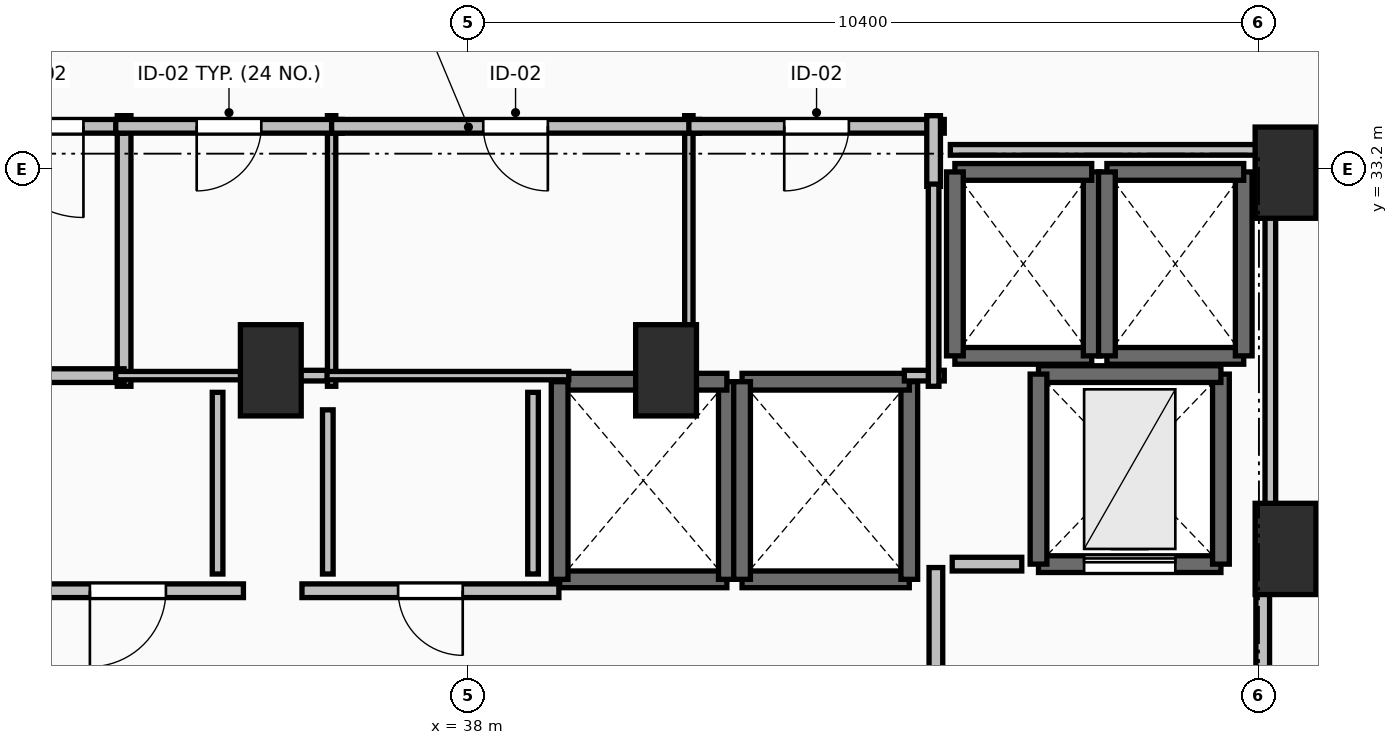
"""IFC4 building model, lengths in metres.
Left out: names, types, materials, properties, quantities, classifications, styles, units other than length and angle.
Written with IfcOpenShell. Run it as: python <this file> out.ifc"""

import sys

from ifc_helpers import new_model, si_unit, direction, frame, frame_2d, origin, origin_2d, place, context, subcontext, project, spatial, rectangle, extrude, element, fill, save


model = new_model("IFC4")
c1 = context("Model", 3, precision=1e-05, world=origin(), true_north=direction((0.0, 1.0)))
c2 = subcontext(c1, "Body", "Model", "MODEL_VIEW")
j1 = project(units=[si_unit("LENGTHUNIT", "METRE"), si_unit("PLANEANGLEUNIT", "RADIAN")], contexts=[c1])
p1 = place(None, origin())
s1 = spatial("IfcSite", under=j1, at=p1, CompositionType="ELEMENT")
p2 = place(p1, origin())
s2 = spatial("IfcBuilding", under=s1, at=p2, CompositionType="ELEMENT")
p3 = place(p2, frame((0.0, 0.0, 146.6)))
s3 = spatial("IfcBuildingStorey", under=s2, at=p3, CompositionType="ELEMENT", Elevation=146.6)
for number, where, z_axis, x_axis in (
    (1, (48.75, 33.15, 0.0), (0.0, 0.0, 1.0), (1.0, 0.0, 0.0)),
    (2, (48.75, 28.2, 0.0), (0.0, 0.0, 1.0), (1.0, 0.0, 0.0)),
    (3, (35.4, 30.55, 0.0), (0.0, 0.0, 1.0), (1.0, 0.0, 0.0)),
    (4, (40.6, 30.55, 0.0), (0.0, 0.0, 1.0), (1.0, 0.0, 0.0)),
):
    element("IfcColumn", number, at=place(p3, frame(where, z_axis=z_axis, x_axis=x_axis)), inside=s3, PredefinedType="PILASTER", context=c2, shape_type="SweptSolid", body=[
        extrude(rectangle(XDim=0.8, YDim=1.2, at=origin_2d()), origin(), (0.0, 0.0, 1.0), 3.5),
    ])
p4 = place(p3, frame((39.2, 27.8, 0.0), z_axis=(0.0, 0.0, 1.0), x_axis=(1.0, 0.0, 0.0)))
e5 = element("IfcWall", 5, at=p4, inside=s3, PredefinedType="SOLIDWALL", context=c2, shape_type="SweptSolid", body=[
    extrude(rectangle(XDim=2.2, YDim=0.22, at=frame_2d((1.1, 0.0))), origin(), (0.0, 0.0, 1.0), 3.24),
])
p5 = place(p3, frame((41.4, 27.8, 0.0), z_axis=(0.0, 0.0, 1.0), x_axis=(0.0, 1.0, 0.0)))
e6 = element("IfcWall", 6, at=p5, inside=s3, PredefinedType="SOLIDWALL", context=c2, shape_type="SweptSolid", body=[
    extrude(rectangle(XDim=2.6, YDim=0.22, at=frame_2d((1.3, 0.0))), origin(), (0.0, 0.0, 1.0), 3.24),
])
p6 = place(p3, frame((41.4, 30.4, 0.0), z_axis=(0.0, 0.0, 1.0), x_axis=(-1.0, 0.0, 0.0)))
e7 = element("IfcWall", 7, at=p6, inside=s3, PredefinedType="SOLIDWALL", context=c2, shape_type="SweptSolid", body=[
    extrude(rectangle(XDim=2.2, YDim=0.22, at=frame_2d((1.1, 0.0))), origin(), (0.0, 0.0, 1.0), 3.24),
])
p7 = place(p3, frame((39.2, 30.4, 0.0), z_axis=(0.0, 0.0, 1.0), x_axis=(0.0, -1.0, 0.0)))
e8 = element("IfcWall", 8, at=p7, inside=s3, PredefinedType="SOLIDWALL", context=c2, shape_type="SweptSolid", body=[
    extrude(rectangle(XDim=2.6, YDim=0.22, at=frame_2d((1.3, 0.0))), origin(), (0.0, 0.0, 1.0), 3.24),
])
p8 = place(p3, frame((41.6, 27.8, 0.0), z_axis=(0.0, 0.0, 1.0), x_axis=(1.0, 0.0, 0.0)))
e9 = element("IfcWall", 9, at=p8, inside=s3, PredefinedType="SOLIDWALL", context=c2, shape_type="SweptSolid", body=[
    extrude(rectangle(XDim=2.2, YDim=0.22, at=frame_2d((1.1, 0.0))), origin(), (0.0, 0.0, 1.0), 3.24),
])
p9 = place(p3, frame((43.8, 27.8, 0.0), z_axis=(0.0, 0.0, 1.0), x_axis=(0.0, 1.0, 0.0)))
e10 = element("IfcWall", 10, at=p9, inside=s3, PredefinedType="SOLIDWALL", context=c2, shape_type="SweptSolid", body=[
    extrude(rectangle(XDim=2.6, YDim=0.22, at=frame_2d((1.3, 0.0))), origin(), (0.0, 0.0, 1.0), 3.24),
])
p10 = place(p3, frame((43.8, 30.4, 0.0), z_axis=(0.0, 0.0, 1.0), x_axis=(-1.0, 0.0, 0.0)))
e11 = element("IfcWall", 11, at=p10, inside=s3, PredefinedType="SOLIDWALL", context=c2, shape_type="SweptSolid", body=[
    extrude(rectangle(XDim=2.2, YDim=0.22, at=frame_2d((1.1, 0.0))), origin(), (0.0, 0.0, 1.0), 3.24),
])
p11 = place(p3, frame((41.6, 30.4, 0.0), z_axis=(0.0, 0.0, 1.0), x_axis=(0.0, -1.0, 0.0)))
e12 = element("IfcWall", 12, at=p11, inside=s3, PredefinedType="SOLIDWALL", context=c2, shape_type="SweptSolid", body=[
    extrude(rectangle(XDim=2.6, YDim=0.22, at=frame_2d((1.3, 0.0))), origin(), (0.0, 0.0, 1.0), 3.24),
])
p12 = place(p3, frame((44.4, 30.74, 0.0), z_axis=(0.0, 0.0, 1.0), x_axis=(1.0, 0.0, 0.0)))
e13 = element("IfcWall", 13, at=p12, inside=s3, PredefinedType="SOLIDWALL", context=c2, shape_type="SweptSolid", body=[
    extrude(rectangle(XDim=1.8, YDim=0.22, at=frame_2d((0.9, 0.0))), origin(), (0.0, 0.0, 1.0), 3.24),
])
p13 = place(p3, frame((46.2, 30.74, 0.0), z_axis=(0.0, 0.0, 1.0), x_axis=(0.0, 1.0, 0.0)))
e14 = element("IfcWall", 14, at=p13, inside=s3, PredefinedType="SOLIDWALL", context=c2, shape_type="SweptSolid", body=[
    extrude(rectangle(XDim=2.42, YDim=0.22, at=frame_2d((1.21, 0.0))), origin(), (0.0, 0.0, 1.0), 3.24),
])
p14 = place(p3, frame((46.2, 33.16, 0.0), z_axis=(0.0, 0.0, 1.0), x_axis=(-1.0, 0.0, 0.0)))
e15 = element("IfcWall", 15, at=p14, inside=s3, PredefinedType="SOLIDWALL", context=c2, shape_type="SweptSolid", body=[
    extrude(rectangle(XDim=1.8, YDim=0.22, at=frame_2d((0.9, 0.0))), origin(), (0.0, 0.0, 1.0), 3.24),
])
p15 = place(p3, frame((44.4, 33.16, 0.0), z_axis=(0.0, 0.0, 1.0), x_axis=(0.0, -1.0, 0.0)))
e16 = element("IfcWall", 16, at=p15, inside=s3, PredefinedType="SOLIDWALL", context=c2, shape_type="SweptSolid", body=[
    extrude(rectangle(XDim=2.42, YDim=0.22, at=frame_2d((1.21, 0.0))), origin(), (0.0, 0.0, 1.0), 3.24),
])
p16 = place(p3, frame((46.4, 30.74, 0.0), z_axis=(0.0, 0.0, 1.0), x_axis=(1.0, 0.0, 0.0)))
e17 = element("IfcWall", 17, at=p16, inside=s3, PredefinedType="SOLIDWALL", context=c2, shape_type="SweptSolid", body=[
    extrude(rectangle(XDim=1.8, YDim=0.22, at=frame_2d((0.9, 0.0))), origin(), (0.0, 0.0, 1.0), 3.24),
])
p17 = place(p3, frame((48.2, 30.74, 0.0), z_axis=(0.0, 0.0, 1.0), x_axis=(0.0, 1.0, 0.0)))
e18 = element("IfcWall", 18, at=p17, inside=s3, PredefinedType="SOLIDWALL", context=c2, shape_type="SweptSolid", body=[
    extrude(rectangle(XDim=2.42, YDim=0.22, at=frame_2d((1.21, 0.0))), origin(), (0.0, 0.0, 1.0), 3.24),
])
p18 = place(p3, frame((48.2, 33.16, 0.0), z_axis=(0.0, 0.0, 1.0), x_axis=(-1.0, 0.0, 0.0)))
e19 = element("IfcWall", 19, at=p18, inside=s3, PredefinedType="SOLIDWALL", context=c2, shape_type="SweptSolid", body=[
    extrude(rectangle(XDim=1.8, YDim=0.22, at=frame_2d((0.9, 0.0))), origin(), (0.0, 0.0, 1.0), 3.24),
])
p19 = place(p3, frame((46.4, 33.16, 0.0), z_axis=(0.0, 0.0, 1.0), x_axis=(0.0, -1.0, 0.0)))
e20 = element("IfcWall", 20, at=p19, inside=s3, PredefinedType="SOLIDWALL", context=c2, shape_type="SweptSolid", body=[
    extrude(rectangle(XDim=2.42, YDim=0.22, at=frame_2d((1.21, 0.0))), origin(), (0.0, 0.0, 1.0), 3.24),
])
p20 = place(p3, frame((45.5, 28.0, 0.0), z_axis=(0.0, 0.0, 1.0), x_axis=(1.0, 0.0, 0.0)))
e21 = element("IfcWall", 21, at=p20, inside=s3, PredefinedType="SHEAR", context=c2, shape_type="SweptSolid", body=[
    extrude(rectangle(XDim=2.4, YDim=0.22, at=frame_2d((1.2, 0.0))), origin(), (0.0, 0.0, 1.0), 3.24),
])
p21 = place(p20, frame((0.6, 0.0, 0.0)))
e22 = element("IfcOpeningElement", 22, at=p21, cuts=e21, PredefinedType="OPENING", context=c2, shape_type="SweptSolid", body=[
    extrude(rectangle(XDim=1.2, YDim=2.2, at=frame_2d((0.6, 1.1))), frame((0.0, 0.125, 0.0), z_axis=(0.0, -1.0, 0.0), x_axis=(1.0, 0.0, 0.0)), (0.0, 0.0, 1.0), 0.25),
])
p22 = place(p3, frame((47.9, 28.0, 0.0), z_axis=(0.0, 0.0, 1.0), x_axis=(0.0, 1.0, 0.0)))
e23 = element("IfcWall", 23, at=p22, inside=s3, PredefinedType="SHEAR", context=c2, shape_type="SweptSolid", body=[
    extrude(rectangle(XDim=2.5, YDim=0.22, at=frame_2d((1.25, 0.0))), origin(), (0.0, 0.0, 1.0), 3.24),
])
p23 = place(p3, frame((47.9, 30.5, 0.0), z_axis=(0.0, 0.0, 1.0), x_axis=(-1.0, 0.0, 0.0)))
e24 = element("IfcWall", 24, at=p23, inside=s3, PredefinedType="SHEAR", context=c2, shape_type="SweptSolid", body=[
    extrude(rectangle(XDim=2.4, YDim=0.22, at=frame_2d((1.2, 0.0))), origin(), (0.0, 0.0, 1.0), 3.24),
])
p24 = place(p3, frame((45.5, 30.5, 0.0), z_axis=(0.0, 0.0, 1.0), x_axis=(0.0, -1.0, 0.0)))
e25 = element("IfcWall", 25, at=p24, inside=s3, PredefinedType="SHEAR", context=c2, shape_type="SweptSolid", body=[
    extrude(rectangle(XDim=2.5, YDim=0.22, at=frame_2d((1.25, 0.0))), origin(), (0.0, 0.0, 1.0), 3.24),
])
p25 = place(p3, frame((44.15, 27.955, 0.0), z_axis=(0.0, 0.0, 1.0), x_axis=(0.0, -1.0, 0.0)))
e26 = element("IfcWall", 26, at=p25, inside=s3, PredefinedType="PARTITIONING", context=c2, shape_type="SweptSolid", body=[
    extrude(rectangle(XDim=3.91, YDim=0.18, at=frame_2d((1.955, 0.0))), origin(), (0.0, 0.0, 1.0), 3.24),
])
p26 = place(p25, frame((1.355, 0.0, 0.0)))
e27 = element("IfcOpeningElement", 27, at=p26, cuts=e26, PredefinedType="OPENING", context=c2, shape_type="SweptSolid", body=[
    extrude(rectangle(XDim=1.2, YDim=2.15, at=frame_2d((0.6, 1.075))), frame((0.0, 0.105, 0.0), z_axis=(0.0, -1.0, 0.0), x_axis=(1.0, 0.0, 0.0)), (0.0, 0.0, 1.0), 0.21),
])
p27 = place(p3, frame((48.45, 23.95, 0.0), z_axis=(0.0, 0.0, 1.0), x_axis=(0.0, 1.0, 0.0)))
e28 = element("IfcWall", 28, at=p27, inside=s3, PredefinedType="PARTITIONING", context=c2, shape_type="SweptSolid", body=[
    extrude(rectangle(XDim=4.05, YDim=0.18, at=frame_2d((2.025, 0.0))), origin(), (0.0, 0.0, 1.0), 3.24),
])
p28 = place(p27, frame((1.425, 0.0, 0.0)))
e29 = element("IfcOpeningElement", 29, at=p28, cuts=e28, PredefinedType="OPENING", context=c2, shape_type="SweptSolid", body=[
    extrude(rectangle(XDim=1.2, YDim=2.15, at=frame_2d((0.6, 1.075))), frame((0.0, 0.105, 0.0), z_axis=(0.0, -1.0, 0.0), x_axis=(1.0, 0.0, 0.0)), (0.0, 0.0, 1.0), 0.21),
])
p29 = place(p3, frame((33.47, 30.34, 0.0), z_axis=(0.0, 0.0, 1.0), x_axis=(0.0, 1.0, 0.0)))
e30 = element("IfcWall", 30, at=p29, inside=s3, PredefinedType="PARTITIONING", context=c2, shape_type="SweptSolid", body=[
    extrude(rectangle(XDim=3.56, YDim=0.18, at=frame_2d((1.78, 0.0))), origin(), (0.0, 0.0, 1.0), 3.24),
])
p30 = place(p3, frame((31.87, 30.48, 0.0), z_axis=(0.0, 0.0, 1.0), x_axis=(1.0, 0.0, 0.0)))
e31 = element("IfcWall", 31, at=p30, inside=s3, PredefinedType="PARTITIONING", context=c2, shape_type="SweptSolid", body=[
    extrude(rectangle(XDim=1.6, YDim=0.18, at=frame_2d((0.8, 0.0))), origin(), (0.0, 0.0, 1.0), 3.24),
])
p31 = place(p3, frame((33.47, 33.76, 0.0), z_axis=(0.0, 0.0, 1.0), x_axis=(-1.0, 0.0, 0.0)))
e32 = element("IfcWall", 32, at=p31, inside=s3, PredefinedType="PARTITIONING", context=c2, shape_type="SweptSolid", body=[
    extrude(rectangle(XDim=2.27, YDim=0.18, at=frame_2d((1.135, 0.0))), origin(), (0.0, 0.0, 1.0), 3.24),
])
p32 = place(p31, frame((0.535, 0.0, 0.0)))
e33 = element("IfcOpeningElement", 33, at=p32, cuts=e32, PredefinedType="OPENING", context=c2, shape_type="SweptSolid", body=[
    extrude(rectangle(XDim=1.2, YDim=2.15, at=frame_2d((0.6, 1.075))), frame((0.0, 0.105, 0.0), z_axis=(0.0, -1.0, 0.0), x_axis=(1.0, 0.0, 0.0)), (0.0, 0.0, 1.0), 0.21),
])
p33 = place(p3, frame((35.04, 27.65, 0.0), z_axis=(0.0, 0.0, 1.0), x_axis=(-1.0, 0.0, 0.0)))
e34 = element("IfcWall", 34, at=p33, inside=s3, PredefinedType="PARTITIONING", context=c2, shape_type="SweptSolid", body=[
    extrude(rectangle(XDim=3.04, YDim=0.18, at=frame_2d((1.52, 0.0))), origin(), (0.0, 0.0, 1.0), 3.24),
])
p34 = place(p33, frame((1.02, 0.0, 0.0)))
e35 = element("IfcOpeningElement", 35, at=p34, cuts=e34, PredefinedType="OPENING", context=c2, shape_type="SweptSolid", body=[
    extrude(rectangle(XDim=1.0, YDim=2.15, at=frame_2d((0.5, 1.075))), frame((0.0, 0.105, 0.0), z_axis=(0.0, -1.0, 0.0), x_axis=(1.0, 0.0, 0.0)), (0.0, 0.0, 1.0), 0.21),
])
p35 = place(p3, frame((39.19, 27.65, 0.0), z_axis=(0.0, 0.0, 1.0), x_axis=(-1.0, 0.0, 0.0)))
e36 = element("IfcWall", 36, at=p35, inside=s3, PredefinedType="PARTITIONING", context=c2, shape_type="SweptSolid", body=[
    extrude(rectangle(XDim=3.38, YDim=0.18, at=frame_2d((1.69, 0.0))), origin(), (0.0, 0.0, 1.0), 3.24),
])
p36 = place(p35, frame((1.265, 0.0, 0.0)))
e37 = element("IfcOpeningElement", 37, at=p36, cuts=e36, PredefinedType="OPENING", context=c2, shape_type="SweptSolid", body=[
    extrude(rectangle(XDim=0.85, YDim=2.1, at=frame_2d((0.425, 1.05))), frame((0.0, 0.105, 0.0), z_axis=(0.0, -1.0, 0.0), x_axis=(1.0, 0.0, 0.0)), (0.0, 0.0, 1.0), 0.21),
])
p37 = place(p3, frame((36.2, 30.34, 0.0), z_axis=(0.0, 0.0, 1.0), x_axis=(0.0, 1.0, 0.0)))
e38 = element("IfcWall", 38, at=p37, inside=s3, PredefinedType="PARTITIONING", context=c2, shape_type="SweptSolid", body=[
    extrude(rectangle(XDim=3.56, YDim=0.11, at=frame_2d((1.78, 0.0))), origin(), (0.0, 0.0, 1.0), 2.432),
])
p38 = place(p3, frame((33.36, 30.48, 0.0), z_axis=(0.0, 0.0, 1.0), x_axis=(1.0, 0.0, 0.0)))
e39 = element("IfcWall", 39, at=p38, inside=s3, PredefinedType="PARTITIONING", context=c2, shape_type="SweptSolid", body=[
    extrude(rectangle(XDim=1.81, YDim=0.11, at=frame_2d((0.905, 0.0))), origin(), (0.0, 0.0, 1.0), 3.24),
])
p39 = place(p3, frame((36.34, 33.76, 0.0), z_axis=(0.0, 0.0, 1.0), x_axis=(-1.0, 0.0, 0.0)))
e40 = element("IfcWall", 40, at=p39, inside=s3, PredefinedType="PARTITIONING", context=c2, shape_type="SweptSolid", body=[
    extrude(rectangle(XDim=2.98, YDim=0.18, at=frame_2d((1.49, 0.0))), origin(), (0.0, 0.0, 1.0), 3.24),
])
p40 = place(p39, frame((1.065, 0.0, 0.0)))
e41 = element("IfcOpeningElement", 41, at=p40, cuts=e40, PredefinedType="OPENING", context=c2, shape_type="SweptSolid", body=[
    extrude(rectangle(XDim=0.85, YDim=2.1, at=frame_2d((0.425, 1.05))), frame((0.0, 0.105, 0.0), z_axis=(0.0, -1.0, 0.0), x_axis=(1.0, 0.0, 0.0)), (0.0, 0.0, 1.0), 0.21),
])
p41 = place(p3, frame((40.9, 30.34, 0.0), z_axis=(0.0, 0.0, 1.0), x_axis=(0.0, 1.0, 0.0)))
e42 = element("IfcWall", 42, at=p41, inside=s3, PredefinedType="PARTITIONING", context=c2, shape_type="SweptSolid", body=[
    extrude(rectangle(XDim=3.56, YDim=0.11, at=frame_2d((1.78, 0.0))), origin(), (0.0, 0.0, 1.0), 3.24),
])
p42 = place(p3, frame((36.11, 30.48, 0.0), z_axis=(0.0, 0.0, 1.0), x_axis=(1.0, 0.0, 0.0)))
e43 = element("IfcWall", 43, at=p42, inside=s3, PredefinedType="PARTITIONING", context=c2, shape_type="SweptSolid", body=[
    extrude(rectangle(XDim=3.21, YDim=0.11, at=frame_2d((1.605, 0.0))), origin(), (0.0, 0.0, 1.0), 2.432),
])
p43 = place(p3, frame((41.04, 33.76, 0.0), z_axis=(0.0, 0.0, 1.0), x_axis=(-1.0, 0.0, 0.0)))
e44 = element("IfcWall", 44, at=p43, inside=s3, PredefinedType="PARTITIONING", context=c2, shape_type="SweptSolid", body=[
    extrude(rectangle(XDim=4.84, YDim=0.18, at=frame_2d((2.42, 0.0))), origin(), (0.0, 0.0, 1.0), 3.24),
])
p44 = place(p43, frame((1.995, 0.0, 0.0)))
e45 = element("IfcOpeningElement", 45, at=p44, cuts=e44, PredefinedType="OPENING", context=c2, shape_type="SweptSolid", body=[
    extrude(rectangle(XDim=0.85, YDim=2.1, at=frame_2d((0.425, 1.05))), frame((0.0, 0.105, 0.0), z_axis=(0.0, -1.0, 0.0), x_axis=(1.0, 0.0, 0.0)), (0.0, 0.0, 1.0), 0.21),
])
p45 = place(p3, frame((44.26, 33.76, 0.0), z_axis=(0.0, 0.0, 1.0), x_axis=(-1.0, 0.0, 0.0)))
e46 = element("IfcWall", 46, at=p45, inside=s3, PredefinedType="PARTITIONING", context=c2, shape_type="SweptSolid", body=[
    extrude(rectangle(XDim=3.36, YDim=0.18, at=frame_2d((1.68, 0.0))), origin(), (0.0, 0.0, 1.0), 3.24),
])
p46 = place(p45, frame((1.255, 0.0, 0.0)))
e47 = element("IfcOpeningElement", 47, at=p46, cuts=e46, PredefinedType="OPENING", context=c2, shape_type="SweptSolid", body=[
    extrude(rectangle(XDim=0.85, YDim=2.1, at=frame_2d((0.425, 1.05))), frame((0.0, 0.105, 0.0), z_axis=(0.0, -1.0, 0.0), x_axis=(1.0, 0.0, 0.0)), (0.0, 0.0, 1.0), 0.21),
])
p47 = place(p3, frame((44.12, 32.97, 0.0), z_axis=(0.0, 0.0, 1.0), x_axis=(0.0, 1.0, 0.0)))
e48 = element("IfcWall", 48, at=p47, inside=s3, PredefinedType="PARTITIONING", context=c2, shape_type="SweptSolid", body=[
    extrude(rectangle(XDim=0.93, YDim=0.18, at=frame_2d((0.465, 0.0))), origin(), (0.0, 0.0, 1.0), 3.24),
])
p48 = place(p3, frame((45.28, 28.0, 0.0), z_axis=(0.0, 0.0, 1.0), x_axis=(-1.0, 0.0, 0.0)))
e49 = element("IfcWall", 49, at=p48, inside=s3, PredefinedType="PARTITIONING", context=c2, shape_type="SweptSolid", body=[
    extrude(rectangle(XDim=0.915, YDim=0.18, at=frame_2d((0.458, 0.0))), origin(), (0.0, 0.0, 1.0), 3.24),
])
p49 = place(p3, frame((35.14, 30.48, 0.0), z_axis=(0.0, 0.0, 1.0), x_axis=(1.0, 0.0, 0.0)))
e50 = element("IfcWall", 50, at=p49, inside=s3, PredefinedType="PARTITIONING", context=c2, shape_type="SweptSolid", body=[
    extrude(rectangle(XDim=1.0, YDim=0.14, at=frame_2d((0.5, 0.0))), origin(), (0.0, 0.0, 1.0), 2.432),
])
p50 = place(p3, frame((43.735, 30.48, 0.0), z_axis=(0.0, 0.0, 1.0), x_axis=(1.0, 0.0, 0.0)))
e51 = element("IfcWall", 51, at=p50, inside=s3, PredefinedType="PARTITIONING", context=c2, shape_type="SweptSolid", body=[
    extrude(rectangle(XDim=0.525, YDim=0.14, at=frame_2d((0.262, 0.0))), origin(), (0.0, 0.0, 1.0), 3.24),
])
p51 = place(p3, frame((44.12, 30.34, 0.0), z_axis=(0.0, 0.0, 1.0), x_axis=(0.0, 1.0, 0.0)))
e52 = element("IfcWall", 52, at=p51, inside=s3, PredefinedType="PARTITIONING", context=c2, shape_type="SweptSolid", body=[
    extrude(rectangle(XDim=2.66, YDim=0.14, at=frame_2d((1.33, 0.0))), origin(), (0.0, 0.0, 1.0), 3.24),
])
p52 = place(p3, frame((34.7, 27.87, 0.0), z_axis=(0.0, 0.0, 1.0), x_axis=(0.0, 1.0, 0.0)))
e53 = element("IfcWall", 53, at=p52, inside=s3, PredefinedType="PARTITIONING", context=c2, shape_type="SweptSolid", body=[
    extrude(rectangle(XDim=2.39, YDim=0.14, at=frame_2d((1.195, 0.0))), origin(), (0.0, 0.0, 1.0), 3.24),
])
p53 = place(p3, frame((36.15, 30.03, 0.0), z_axis=(0.0, 0.0, 1.0), x_axis=(0.0, -1.0, 0.0)))
e54 = element("IfcWall", 54, at=p53, inside=s3, PredefinedType="PARTITIONING", context=c2, shape_type="SweptSolid", body=[
    extrude(rectangle(XDim=2.16, YDim=0.14, at=frame_2d((1.08, 0.0))), origin(), (0.0, 0.0, 1.0), 3.24),
])
p54 = place(p3, frame((38.85, 27.87, 0.0), z_axis=(0.0, 0.0, 1.0), x_axis=(0.0, 1.0, 0.0)))
e55 = element("IfcWall", 55, at=p54, inside=s3, PredefinedType="PARTITIONING", context=c2, shape_type="SweptSolid", body=[
    extrude(rectangle(XDim=2.39, YDim=0.14, at=frame_2d((1.195, 0.0))), origin(), (0.0, 0.0, 1.0), 3.24),
])
p55 = place(p3, frame((48.55, 28.196, 0.0), z_axis=(0.0, 0.0, 1.0), x_axis=(0.0, 1.0, 0.0)))
e56 = element("IfcWall", 56, at=p55, inside=s3, PredefinedType="PARTITIONING", context=c2, shape_type="SweptSolid", body=[
    extrude(rectangle(XDim=5.254, YDim=0.14, at=frame_2d((2.627, 0.0))), origin(), (0.0, 0.0, 1.0), 2.432),
])
p56 = place(p3, frame((48.55, 33.45, 0.0), z_axis=(0.0, 0.0, 1.0), x_axis=(-1.0, 0.0, 0.0)))
e57 = element("IfcWall", 57, at=p56, inside=s3, PredefinedType="PARTITIONING", context=c2, shape_type="SweptSolid", body=[
    extrude(rectangle(XDim=4.21, YDim=0.14, at=frame_2d((2.105, 0.0))), origin(), (0.0, 0.0, 1.0), 2.432),
])
p57 = place(p21, origin())
e58 = element("IfcDoor", 58, at=p57, inside=s3, OperationType="SLIDING_TO_LEFT", PredefinedType="DOOR", context=c2, shape_type="SweptSolid", body=[
    extrude(rectangle(XDim=1.2, YDim=2.2, at=frame_2d((0.6, 1.1))), frame((0.0, 0.025, 0.0), z_axis=(0.0, -1.0, 0.0), x_axis=(1.0, 0.0, 0.0)), (0.0, 0.0, 1.0), 0.05),
])
fill(e22, e58)
p58 = place(p32, origin())
e59 = element("IfcDoor", 59, at=p58, inside=s3, OperationType="SINGLE_SWING_LEFT", PredefinedType="DOOR", context=c2, shape_type="SweptSolid", body=[
    extrude(rectangle(XDim=1.2, YDim=2.15, at=frame_2d((0.6, 1.075))), frame((0.0, 0.025, 0.0), z_axis=(0.0, -1.0, 0.0), x_axis=(1.0, 0.0, 0.0)), (0.0, 0.0, 1.0), 0.05),
])
fill(e33, e59)
p59 = place(p34, origin())
e60 = element("IfcDoor", 60, at=p59, inside=s3, OperationType="SINGLE_SWING_RIGHT", PredefinedType="DOOR", context=c2, shape_type="SweptSolid", body=[
    extrude(rectangle(XDim=1.0, YDim=2.15, at=frame_2d((0.5, 1.075))), frame((0.0, 0.025, 0.0), z_axis=(0.0, -1.0, 0.0), x_axis=(1.0, 0.0, 0.0)), (0.0, 0.0, 1.0), 0.05),
])
fill(e35, e60)
p60 = place(p36, origin())
e61 = element("IfcDoor", 61, at=p60, inside=s3, OperationType="SINGLE_SWING_LEFT", PredefinedType="DOOR", context=c2, shape_type="SweptSolid", body=[
    extrude(rectangle(XDim=0.85, YDim=2.1, at=frame_2d((0.425, 1.05))), frame((0.0, 0.025, 0.0), z_axis=(0.0, -1.0, 0.0), x_axis=(1.0, 0.0, 0.0)), (0.0, 0.0, 1.0), 0.05),
])
fill(e37, e61)
p61 = place(p40, origin())
e62 = element("IfcDoor", 62, at=p61, inside=s3, OperationType="SINGLE_SWING_RIGHT", PredefinedType="DOOR", context=c2, shape_type="SweptSolid", body=[
    extrude(rectangle(XDim=0.85, YDim=2.1, at=frame_2d((0.425, 1.05))), frame((0.0, 0.025, 0.0), z_axis=(0.0, -1.0, 0.0), x_axis=(1.0, 0.0, 0.0)), (0.0, 0.0, 1.0), 0.05),
])
fill(e41, e62)
p62 = place(p44, origin())
e63 = element("IfcDoor", 63, at=p62, inside=s3, OperationType="SINGLE_SWING_LEFT", PredefinedType="DOOR", context=c2, shape_type="SweptSolid", body=[
    extrude(rectangle(XDim=0.85, YDim=2.1, at=frame_2d((0.425, 1.05))), frame((0.0, 0.025, 0.0), z_axis=(0.0, -1.0, 0.0), x_axis=(1.0, 0.0, 0.0)), (0.0, 0.0, 1.0), 0.05),
])
fill(e45, e63)
p63 = place(p46, origin())
e64 = element("IfcDoor", 64, at=p63, inside=s3, OperationType="SINGLE_SWING_RIGHT", PredefinedType="DOOR", context=c2, shape_type="SweptSolid", body=[
    extrude(rectangle(XDim=0.85, YDim=2.1, at=frame_2d((0.425, 1.05))), frame((0.0, 0.025, 0.0), z_axis=(0.0, -1.0, 0.0), x_axis=(1.0, 0.0, 0.0)), (0.0, 0.0, 1.0), 0.05),
])
fill(e47, e64)
save(model, sys.argv[1])
